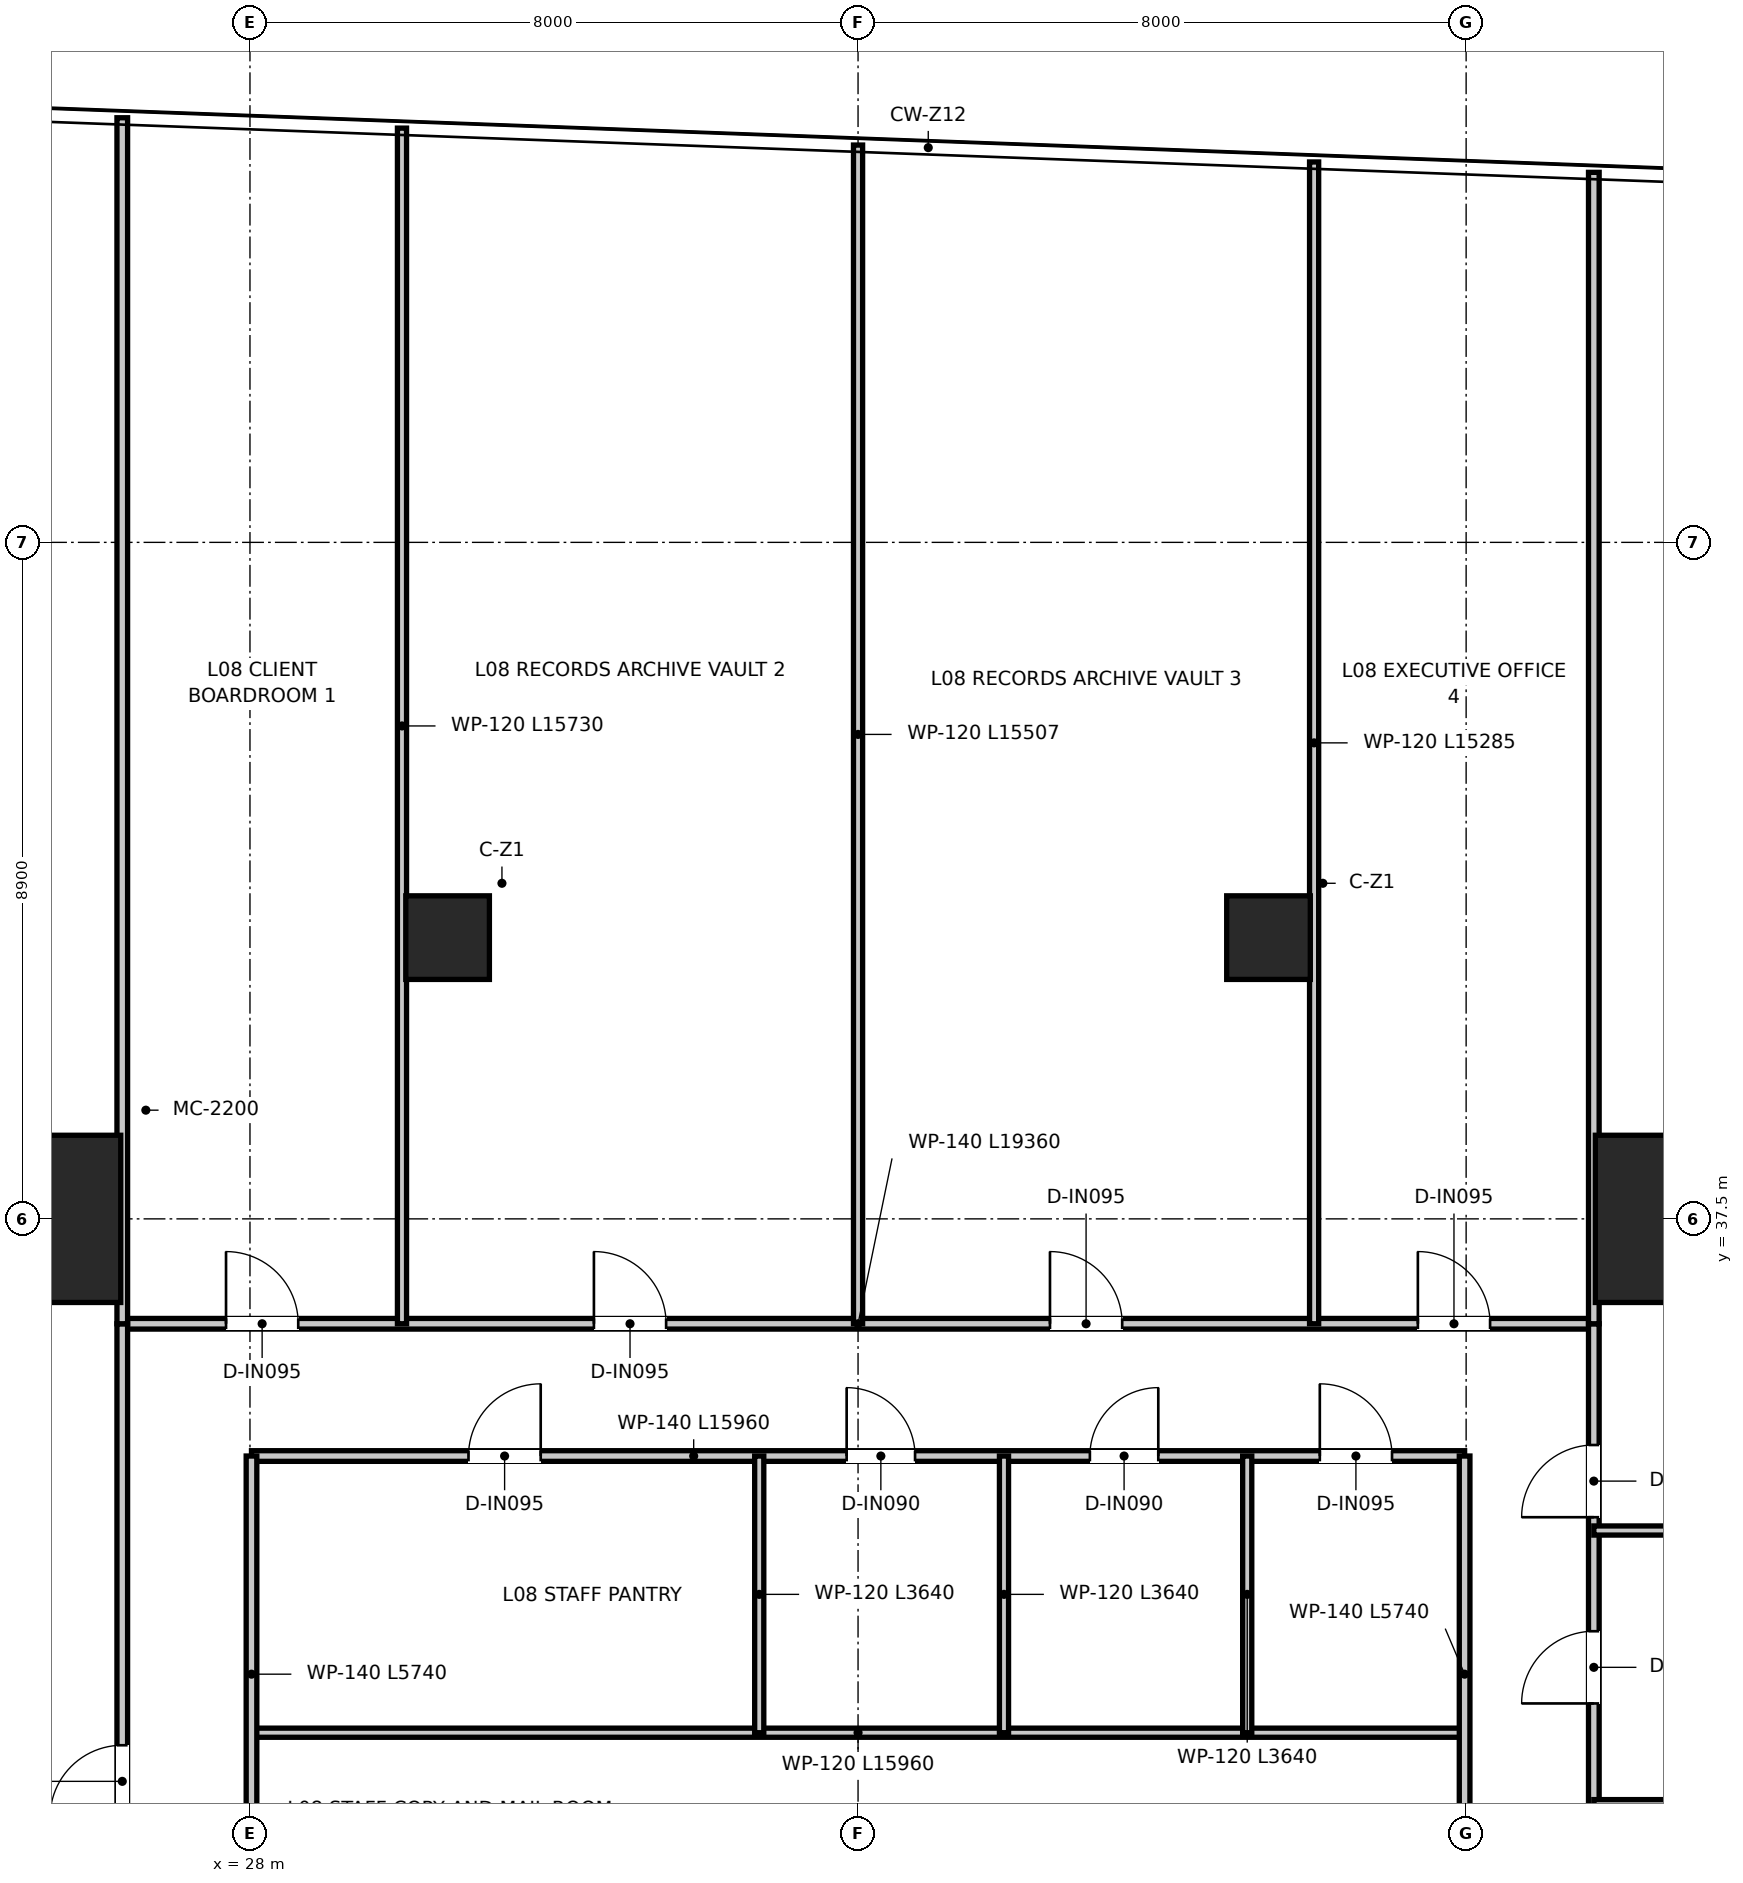
"""IFC4 building model, lengths in metres.
Left out: names, types, materials, properties, quantities, classifications, styles, units other than length and angle.
Written with IfcOpenShell. Run it as: python <this file> out.ifc"""

import sys

from ifc_helpers import new_model, si_unit, direction, frame, frame_2d, origin, origin_2d, place, context, subcontext, project, spatial, rectangle, extrude, source, transform, mapped, element, fill, save


model = new_model("IFC4")
c1 = context("Model", 3, precision=1e-05, world=origin(), true_north=direction((0.0, 1.0)))
c2 = subcontext(c1, "Body", "Model", "MODEL_VIEW")
j1 = project(units=[si_unit("LENGTHUNIT", "METRE"), si_unit("PLANEANGLEUNIT", "RADIAN")], contexts=[c1])
p1 = place(None, origin())
s1 = spatial("IfcSite", under=j1, at=p1, CompositionType="ELEMENT")
p2 = place(p1, origin())
s2 = spatial("IfcBuilding", under=s1, at=p2, CompositionType="ELEMENT")
p3 = place(p2, frame((0.0, 0.0, 36.85)))
s3 = spatial("IfcBuildingStorey", under=s2, at=p3, CompositionType="ELEMENT", Elevation=36.85)
m1 = source(origin(), c2, "Body", "SweptSolid", [
    extrude(rectangle(XDim=2.2, YDim=2.2, at=origin_2d()), origin(), (0.0, 0.0, 1.0), 3.95),
])
for number, where, z_axis, x_axis in (
    (1, (46.8, 37.5, 0.0), (0.0, 0.0, 1.0), (1.0, 0.0, 0.0)),
    (2, (25.2, 37.5, 0.0), (0.0, 0.0, 1.0), (1.0, 0.0, 0.0)),
):
    element("IfcColumn", number, at=place(p3, frame(where, z_axis=z_axis, x_axis=x_axis)), inside=s3, PredefinedType="USERDEFINED", context=c2, shape_type="MappedRepresentation", body=[
        mapped(m1, transform((0.0, 0.0, 0.0), x_axis=(1.0, 0.0, 0.0), y_axis=(0.0, 1.0, 0.0), z_axis=(0.0, 0.0, 1.0), scale=1.0)),
    ])
m2 = source(origin(), c2, "Body", "SweptSolid", [
    extrude(rectangle(XDim=1.1, YDim=1.1, at=origin_2d()), origin(), (0.0, 0.0, 1.0), 3.95),
])
for number, where, z_axis, x_axis in (
    (3, (30.6, 41.2, 0.0), (0.0, 0.0, 1.0), (1.0, 0.0, 0.0)),
    (4, (41.4, 41.2, 0.0), (0.0, 0.0, 1.0), (1.0, 0.0, 0.0)),
):
    element("IfcColumn", number, at=place(p3, frame(where, z_axis=z_axis, x_axis=x_axis)), inside=s3, PredefinedType="COLUMN", context=c2, shape_type="MappedRepresentation", body=[
        mapped(m2, transform((0.0, 0.0, 0.0), x_axis=(1.0, 0.0, 0.0), y_axis=(0.0, 1.0, 0.0), z_axis=(0.0, 0.0, 1.0), scale=1.0)),
    ])
p4 = place(p3, frame((28.02, 30.74, 0.0), z_axis=(0.0, 0.0, 1.0), x_axis=(1.0, 0.0, 0.0)))
e5 = element("IfcWall", 5, at=p4, inside=s3, PredefinedType="PARTITIONING", context=c2, shape_type="SweptSolid", body=[
    extrude(rectangle(XDim=15.96, YDim=0.12, at=frame_2d((7.98, 0.0))), origin(), (0.0, 0.0, 1.0), 3.08),
])
p5 = place(p3, frame((28.02, 34.38, 0.0), z_axis=(0.0, 0.0, 1.0), x_axis=(1.0, 0.0, 0.0)))
e6 = element("IfcWall", 6, at=p5, inside=s3, PredefinedType="PARTITIONING", context=c2, shape_type="SweptSolid", body=[
    extrude(rectangle(XDim=15.96, YDim=0.14, at=frame_2d((7.98, 0.0))), origin(), (0.0, 0.0, 1.0), 3.08),
])
p6 = place(p5, frame((7.83, 0.0, 0.0)))
e7 = element("IfcOpeningElement", 7, at=p6, cuts=e6, PredefinedType="OPENING", context=c2, shape_type="SweptSolid", body=[
    extrude(rectangle(XDim=0.9, YDim=2.1, at=frame_2d((0.45, 1.05))), frame((0.0, 0.08, 0.0), z_axis=(0.0, -1.0, 0.0), x_axis=(1.0, 0.0, 0.0)), (0.0, 0.0, 1.0), 0.16),
])
p7 = place(p5, frame((11.03, 0.0, 0.0)))
e8 = element("IfcOpeningElement", 8, at=p7, cuts=e6, PredefinedType="OPENING", context=c2, shape_type="SweptSolid", body=[
    extrude(rectangle(XDim=0.9, YDim=2.1, at=frame_2d((0.45, 1.05))), frame((0.0, 0.08, 0.0), z_axis=(0.0, -1.0, 0.0), x_axis=(1.0, 0.0, 0.0)), (0.0, 0.0, 1.0), 0.16),
])
p8 = place(p5, frame((14.055, 0.0, 0.0)))
e9 = element("IfcOpeningElement", 9, at=p8, cuts=e6, PredefinedType="OPENING", context=c2, shape_type="SweptSolid", body=[
    extrude(rectangle(XDim=0.95, YDim=2.1, at=frame_2d((0.475, 1.05))), frame((0.0, 0.08, 0.0), z_axis=(0.0, -1.0, 0.0), x_axis=(1.0, 0.0, 0.0)), (0.0, 0.0, 1.0), 0.16),
])
p9 = place(p5, frame((2.855, 0.0, 0.0)))
e10 = element("IfcOpeningElement", 10, at=p9, cuts=e6, PredefinedType="OPENING", context=c2, shape_type="SweptSolid", body=[
    extrude(rectangle(XDim=0.95, YDim=2.1, at=frame_2d((0.475, 1.05))), frame((0.0, 0.08, 0.0), z_axis=(0.0, -1.0, 0.0), x_axis=(1.0, 0.0, 0.0)), (0.0, 0.0, 1.0), 0.16),
])
for number, where, z_axis, x_axis in (
    (11, (28.02, 28.64, 0.0), (0.0, 0.0, 1.0), (0.0, 1.0, 0.0)),
    (12, (43.98, 28.64, 0.0), (0.0, 0.0, 1.0), (0.0, 1.0, 0.0)),
):
    element("IfcWall", number, at=place(p3, frame(where, z_axis=z_axis, x_axis=x_axis)), inside=s3, PredefinedType="PARTITIONING", context=c2, shape_type="SweptSolid", body=[
        extrude(rectangle(XDim=5.74, YDim=0.14, at=frame_2d((2.87, 0.0))), origin(), (0.0, 0.0, 1.0), 3.22),
    ])
for number, where, z_axis, x_axis in (
    (13, (37.92, 30.74, 0.0), (0.0, 0.0, 1.0), (0.0, 1.0, 0.0)),
    (14, (41.12, 30.74, 0.0), (0.0, 0.0, 1.0), (0.0, 1.0, 0.0)),
    (15, (34.7, 30.74, 0.0), (0.0, 0.0, 1.0), (0.0, 1.0, 0.0)),
):
    element("IfcWall", number, at=place(p3, frame(where, z_axis=z_axis, x_axis=x_axis)), inside=s3, PredefinedType="PARTITIONING", context=c2, shape_type="SweptSolid", body=[
        extrude(rectangle(XDim=3.64, YDim=0.12, at=frame_2d((1.82, 0.0))), origin(), (0.0, 0.0, 1.0), 3.12),
    ])
p10 = place(p3, frame((26.32, 36.12, 0.0), z_axis=(0.0, 0.0, 1.0), x_axis=(1.0, 0.0, 0.0)))
e16 = element("IfcWall", 16, at=p10, inside=s3, PredefinedType="PARTITIONING", context=c2, shape_type="SweptSolid", body=[
    extrude(rectangle(XDim=19.36, YDim=0.14, at=frame_2d((9.68, 0.0))), origin(), (0.0, 0.0, 1.0), 3.08),
])
p11 = place(p10, frame((1.365, 0.0, 0.0)))
e17 = element("IfcOpeningElement", 17, at=p11, cuts=e16, PredefinedType="OPENING", context=c2, shape_type="SweptSolid", body=[
    extrude(rectangle(XDim=0.95, YDim=2.1, at=frame_2d((0.475, 1.05))), frame((0.0, 0.08, 0.0), z_axis=(0.0, -1.0, 0.0), x_axis=(1.0, 0.0, 0.0)), (0.0, 0.0, 1.0), 0.16),
])
p12 = place(p10, frame((6.205, 0.0, 0.0)))
e18 = element("IfcOpeningElement", 18, at=p12, cuts=e16, PredefinedType="OPENING", context=c2, shape_type="SweptSolid", body=[
    extrude(rectangle(XDim=0.95, YDim=2.1, at=frame_2d((0.475, 1.05))), frame((0.0, 0.08, 0.0), z_axis=(0.0, -1.0, 0.0), x_axis=(1.0, 0.0, 0.0)), (0.0, 0.0, 1.0), 0.16),
])
p13 = place(p10, frame((12.205, 0.0, 0.0)))
e19 = element("IfcOpeningElement", 19, at=p13, cuts=e16, PredefinedType="OPENING", context=c2, shape_type="SweptSolid", body=[
    extrude(rectangle(XDim=0.95, YDim=2.1, at=frame_2d((0.475, 1.05))), frame((0.0, 0.08, 0.0), z_axis=(0.0, -1.0, 0.0), x_axis=(1.0, 0.0, 0.0)), (0.0, 0.0, 1.0), 0.16),
])
p14 = place(p10, frame((17.045, 0.0, 0.0)))
e20 = element("IfcOpeningElement", 20, at=p14, cuts=e16, PredefinedType="OPENING", context=c2, shape_type="SweptSolid", body=[
    extrude(rectangle(XDim=0.95, YDim=2.1, at=frame_2d((0.475, 1.05))), frame((0.0, 0.08, 0.0), z_axis=(0.0, -1.0, 0.0), x_axis=(1.0, 0.0, 0.0)), (0.0, 0.0, 1.0), 0.16),
])
p15 = place(p3, frame((26.32, 10.5, 0.0), z_axis=(0.0, 0.0, 1.0), x_axis=(0.0, 1.0, 0.0)))
e21 = element("IfcWall", 21, at=p15, inside=s3, PredefinedType="PARTITIONING", context=c2, shape_type="SweptSolid", body=[
    extrude(rectangle(XDim=25.62, YDim=0.14, at=frame_2d((12.81, 0.0))), origin(), (0.0, 0.0, 1.0), 2.97),
])
p16 = place(p15, frame((10.525, 0.0, 0.0)))
e22 = element("IfcOpeningElement", 22, at=p16, cuts=e21, PredefinedType="OPENING", context=c2, shape_type="SweptSolid", body=[
    extrude(rectangle(XDim=0.95, YDim=2.1, at=frame_2d((0.475, 1.05))), frame((0.0, 0.08, 0.0), z_axis=(0.0, -1.0, 0.0), x_axis=(1.0, 0.0, 0.0)), (0.0, 0.0, 1.0), 0.16),
])
p17 = place(p15, frame((19.125, 0.0, 0.0)))
e23 = element("IfcOpeningElement", 23, at=p17, cuts=e21, PredefinedType="OPENING", context=c2, shape_type="SweptSolid", body=[
    extrude(rectangle(XDim=0.95, YDim=2.1, at=frame_2d((0.475, 1.05))), frame((0.0, 0.08, 0.0), z_axis=(0.0, -1.0, 0.0), x_axis=(1.0, 0.0, 0.0)), (0.0, 0.0, 1.0), 0.16),
])
p18 = place(p3, frame((45.68, 10.5, 0.0), z_axis=(0.0, 0.0, 1.0), x_axis=(0.0, 1.0, 0.0)))
e24 = element("IfcWall", 24, at=p18, inside=s3, PredefinedType="PARTITIONING", context=c2, shape_type="SweptSolid", body=[
    extrude(rectangle(XDim=25.62, YDim=0.14, at=frame_2d((12.81, 0.0))), origin(), (0.0, 0.0, 1.0), 2.97),
])
p19 = place(p18, frame((7.675, 0.0, 0.0)))
e25 = element("IfcOpeningElement", 25, at=p19, cuts=e24, PredefinedType="OPENING", context=c2, shape_type="SweptSolid", body=[
    extrude(rectangle(XDim=0.95, YDim=2.1, at=frame_2d((0.475, 1.05))), frame((0.0, 0.08, 0.0), z_axis=(0.0, -1.0, 0.0), x_axis=(1.0, 0.0, 0.0)), (0.0, 0.0, 1.0), 0.16),
])
p20 = place(p18, frame((11.325, 0.0, 0.0)))
e26 = element("IfcOpeningElement", 26, at=p20, cuts=e24, PredefinedType="OPENING", context=c2, shape_type="SweptSolid", body=[
    extrude(rectangle(XDim=0.95, YDim=2.1, at=frame_2d((0.475, 1.05))), frame((0.0, 0.08, 0.0), z_axis=(0.0, -1.0, 0.0), x_axis=(1.0, 0.0, 0.0)), (0.0, 0.0, 1.0), 0.16),
])
p21 = place(p18, frame((16.325, 0.0, 0.0)))
e27 = element("IfcOpeningElement", 27, at=p21, cuts=e24, PredefinedType="OPENING", context=c2, shape_type="SweptSolid", body=[
    extrude(rectangle(XDim=0.95, YDim=2.1, at=frame_2d((0.475, 1.05))), frame((0.0, 0.08, 0.0), z_axis=(0.0, -1.0, 0.0), x_axis=(1.0, 0.0, 0.0)), (0.0, 0.0, 1.0), 0.16),
])
p22 = place(p18, frame((20.625, 0.0, 0.0)))
e28 = element("IfcOpeningElement", 28, at=p22, cuts=e24, PredefinedType="OPENING", context=c2, shape_type="SweptSolid", body=[
    extrude(rectangle(XDim=0.95, YDim=2.1, at=frame_2d((0.475, 1.05))), frame((0.0, 0.08, 0.0), z_axis=(0.0, -1.0, 0.0), x_axis=(1.0, 0.0, 0.0)), (0.0, 0.0, 1.0), 0.16),
])
p23 = place(p18, frame((23.075, 0.0, 0.0)))
e29 = element("IfcOpeningElement", 29, at=p23, cuts=e24, PredefinedType="OPENING", context=c2, shape_type="SweptSolid", body=[
    extrude(rectangle(XDim=0.95, YDim=2.1, at=frame_2d((0.475, 1.05))), frame((0.0, 0.08, 0.0), z_axis=(0.0, -1.0, 0.0), x_axis=(1.0, 0.0, 0.0)), (0.0, 0.0, 1.0), 0.16),
])
p24 = place(p3, frame((26.32, 36.12, 0.0), z_axis=(0.0, 0.0, 1.0), x_axis=(0.0, 1.0, 0.0)))
e30 = element("IfcWall", 30, at=p24, inside=s3, PredefinedType="PARTITIONING", context=c2, shape_type="SweptSolid", body=[
    extrude(rectangle(XDim=15.866, YDim=0.14, at=frame_2d((7.933, 0.0))), origin(), (0.0, 0.0, 1.0), 2.97),
])
p25 = place(p3, frame((45.68, 36.12, 0.0), z_axis=(0.0, 0.0, 1.0), x_axis=(0.0, 1.0, 0.0)))
e31 = element("IfcWall", 31, at=p25, inside=s3, PredefinedType="PARTITIONING", context=c2, shape_type="SweptSolid", body=[
    extrude(rectangle(XDim=15.148, YDim=0.14, at=frame_2d((7.574, 0.0))), origin(), (0.0, 0.0, 1.0), 2.97),
])
p26 = place(p3, frame((30.0, 36.12, 0.0), z_axis=(0.0, 0.0, 1.0), x_axis=(0.0, 1.0, 0.0)))
e32 = element("IfcWall", 32, at=p26, inside=s3, PredefinedType="PARTITIONING", context=c2, shape_type="SweptSolid", body=[
    extrude(rectangle(XDim=15.73, YDim=0.12, at=frame_2d((7.865, 0.0))), origin(), (0.0, 0.0, 1.0), 2.97),
])
p27 = place(p3, frame((36.0, 36.12, 0.0), z_axis=(0.0, 0.0, 1.0), x_axis=(0.0, 1.0, 0.0)))
e33 = element("IfcWall", 33, at=p27, inside=s3, PredefinedType="PARTITIONING", context=c2, shape_type="SweptSolid", body=[
    extrude(rectangle(XDim=15.507, YDim=0.12, at=frame_2d((7.753, 0.0))), origin(), (0.0, 0.0, 1.0), 2.97),
])
p28 = place(p3, frame((42.0, 36.12, 0.0), z_axis=(0.0, 0.0, 1.0), x_axis=(0.0, 1.0, 0.0)))
e34 = element("IfcWall", 34, at=p28, inside=s3, PredefinedType="PARTITIONING", context=c2, shape_type="SweptSolid", body=[
    extrude(rectangle(XDim=15.284, YDim=0.12, at=frame_2d((7.642, 0.0))), origin(), (0.0, 0.0, 1.0), 2.97),
])
p29 = place(p3, frame((45.68, 29.8, 0.0), z_axis=(0.0, 0.0, 1.0), x_axis=(1.0, 0.0, 0.0)))
e35 = element("IfcWall", 35, at=p29, inside=s3, PredefinedType="PARTITIONING", context=c2, shape_type="SweptSolid", body=[
    extrude(rectangle(XDim=15.362, YDim=0.12, at=frame_2d((7.681, 0.0))), origin(), (0.0, 0.0, 1.0), 2.97),
])
p30 = place(p3, frame((45.68, 33.4, 0.0), z_axis=(0.0, 0.0, 1.0), x_axis=(1.0, 0.0, 0.0)))
e36 = element("IfcWall", 36, at=p30, inside=s3, PredefinedType="PARTITIONING", context=c2, shape_type="SweptSolid", body=[
    extrude(rectangle(XDim=15.496, YDim=0.12, at=frame_2d((7.748, 0.0))), origin(), (0.0, 0.0, 1.0), 2.97),
])
p31 = place(p6, origin())
e37 = element("IfcDoor", 37, at=p31, inside=s3, OperationType="SINGLE_SWING_LEFT", PredefinedType="DOOR", context=c2, shape_type="SweptSolid", body=[
    extrude(rectangle(XDim=0.9, YDim=2.1, at=frame_2d((0.45, 1.05))), frame((0.0, 0.025, 0.0), z_axis=(0.0, -1.0, 0.0), x_axis=(1.0, 0.0, 0.0)), (0.0, 0.0, 1.0), 0.05),
])
fill(e7, e37)
p32 = place(p7, origin())
e38 = element("IfcDoor", 38, at=p32, inside=s3, OperationType="SINGLE_SWING_RIGHT", PredefinedType="DOOR", context=c2, shape_type="SweptSolid", body=[
    extrude(rectangle(XDim=0.9, YDim=2.1, at=frame_2d((0.45, 1.05))), frame((0.0, 0.025, 0.0), z_axis=(0.0, -1.0, 0.0), x_axis=(1.0, 0.0, 0.0)), (0.0, 0.0, 1.0), 0.05),
])
fill(e8, e38)
p33 = place(p8, origin())
e39 = element("IfcDoor", 39, at=p33, inside=s3, OperationType="SINGLE_SWING_LEFT", PredefinedType="DOOR", context=c2, shape_type="SweptSolid", body=[
    extrude(rectangle(XDim=0.95, YDim=2.1, at=frame_2d((0.475, 1.05))), frame((0.0, 0.025, 0.0), z_axis=(0.0, -1.0, 0.0), x_axis=(1.0, 0.0, 0.0)), (0.0, 0.0, 1.0), 0.05),
])
fill(e9, e39)
p34 = place(p9, origin())
e40 = element("IfcDoor", 40, at=p34, inside=s3, OperationType="SINGLE_SWING_RIGHT", PredefinedType="DOOR", context=c2, shape_type="SweptSolid", body=[
    extrude(rectangle(XDim=0.95, YDim=2.1, at=frame_2d((0.475, 1.05))), frame((0.0, 0.025, 0.0), z_axis=(0.0, -1.0, 0.0), x_axis=(1.0, 0.0, 0.0)), (0.0, 0.0, 1.0), 0.05),
])
fill(e10, e40)
p35 = place(p11, origin())
e41 = element("IfcDoor", 41, at=p35, inside=s3, OperationType="SINGLE_SWING_LEFT", PredefinedType="DOOR", context=c2, shape_type="SweptSolid", body=[
    extrude(rectangle(XDim=0.95, YDim=2.1, at=frame_2d((0.475, 1.05))), frame((0.0, 0.025, 0.0), z_axis=(0.0, -1.0, 0.0), x_axis=(1.0, 0.0, 0.0)), (0.0, 0.0, 1.0), 0.05),
])
fill(e17, e41)
p36 = place(p12, origin())
e42 = element("IfcDoor", 42, at=p36, inside=s3, OperationType="SINGLE_SWING_LEFT", PredefinedType="DOOR", context=c2, shape_type="SweptSolid", body=[
    extrude(rectangle(XDim=0.95, YDim=2.1, at=frame_2d((0.475, 1.05))), frame((0.0, 0.025, 0.0), z_axis=(0.0, -1.0, 0.0), x_axis=(1.0, 0.0, 0.0)), (0.0, 0.0, 1.0), 0.05),
])
fill(e18, e42)
p37 = place(p13, origin())
e43 = element("IfcDoor", 43, at=p37, inside=s3, OperationType="SINGLE_SWING_LEFT", PredefinedType="DOOR", context=c2, shape_type="SweptSolid", body=[
    extrude(rectangle(XDim=0.95, YDim=2.1, at=frame_2d((0.475, 1.05))), frame((0.0, 0.025, 0.0), z_axis=(0.0, -1.0, 0.0), x_axis=(1.0, 0.0, 0.0)), (0.0, 0.0, 1.0), 0.05),
])
fill(e19, e43)
p38 = place(p14, origin())
e44 = element("IfcDoor", 44, at=p38, inside=s3, OperationType="SINGLE_SWING_LEFT", PredefinedType="DOOR", context=c2, shape_type="SweptSolid", body=[
    extrude(rectangle(XDim=0.95, YDim=2.1, at=frame_2d((0.475, 1.05))), frame((0.0, 0.025, 0.0), z_axis=(0.0, -1.0, 0.0), x_axis=(1.0, 0.0, 0.0)), (0.0, 0.0, 1.0), 0.05),
])
fill(e20, e44)
p39 = place(p17, origin())
e45 = element("IfcDoor", 45, at=p39, inside=s3, OperationType="SINGLE_SWING_LEFT", PredefinedType="DOOR", context=c2, shape_type="SweptSolid", body=[
    extrude(rectangle(XDim=0.95, YDim=2.1, at=frame_2d((0.475, 1.05))), frame((0.0, 0.025, 0.0), z_axis=(0.0, -1.0, 0.0), x_axis=(1.0, 0.0, 0.0)), (0.0, 0.0, 1.0), 0.05),
])
fill(e23, e45)
p40 = place(p22, origin())
e46 = element("IfcDoor", 46, at=p40, inside=s3, OperationType="SINGLE_SWING_LEFT", PredefinedType="DOOR", context=c2, shape_type="SweptSolid", body=[
    extrude(rectangle(XDim=0.95, YDim=2.1, at=frame_2d((0.475, 1.05))), frame((0.0, 0.025, 0.0), z_axis=(0.0, -1.0, 0.0), x_axis=(1.0, 0.0, 0.0)), (0.0, 0.0, 1.0), 0.05),
])
fill(e28, e46)
p41 = place(p23, origin())
e47 = element("IfcDoor", 47, at=p41, inside=s3, OperationType="SINGLE_SWING_LEFT", PredefinedType="DOOR", context=c2, shape_type="SweptSolid", body=[
    extrude(rectangle(XDim=0.95, YDim=2.1, at=frame_2d((0.475, 1.05))), frame((0.0, 0.025, 0.0), z_axis=(0.0, -1.0, 0.0), x_axis=(1.0, 0.0, 0.0)), (0.0, 0.0, 1.0), 0.05),
])
fill(e29, e47)
save(model, sys.argv[1])
